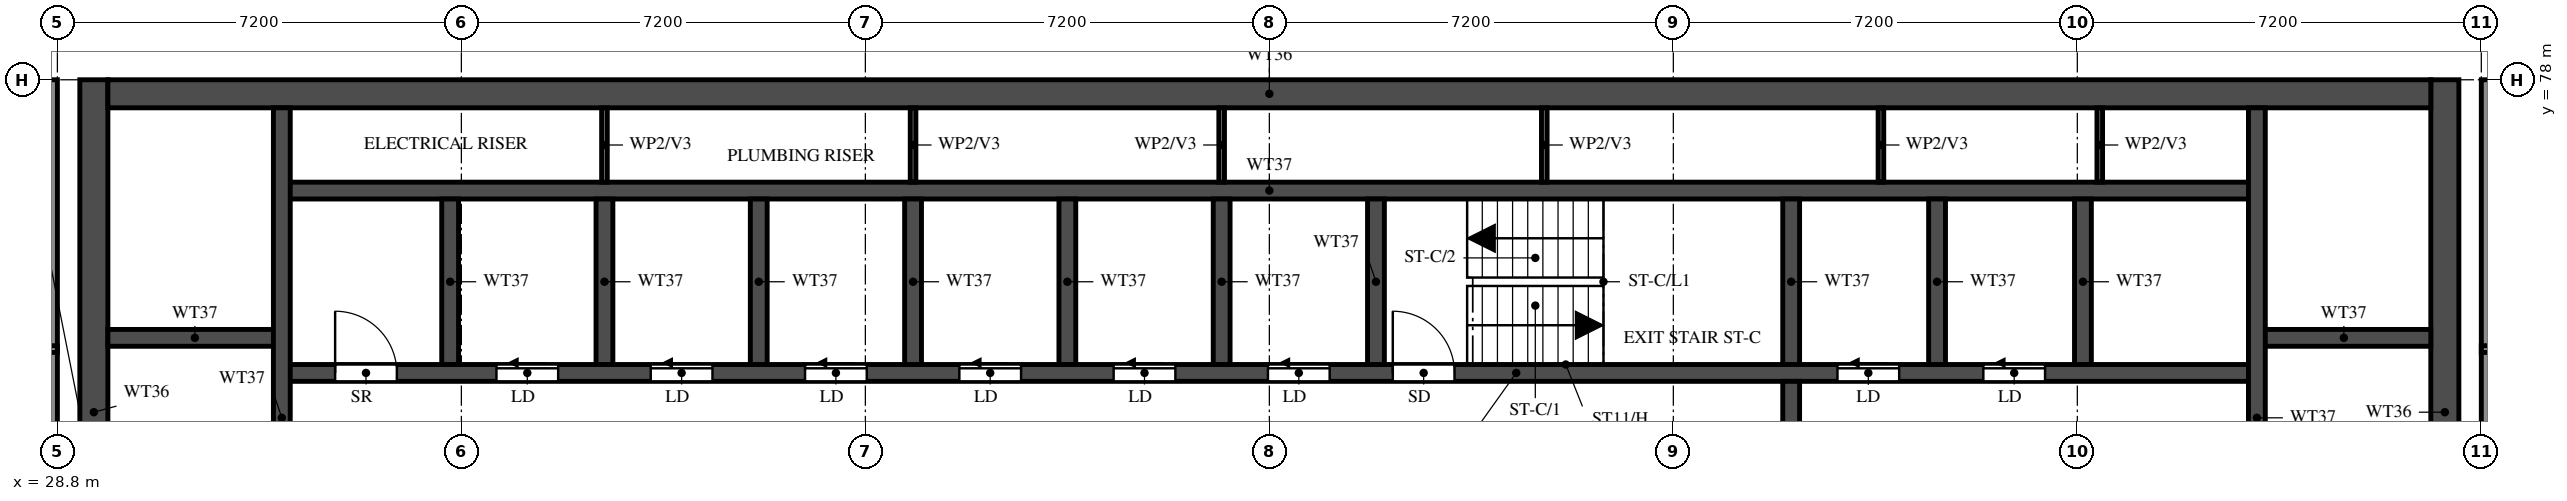
"""IFC4 building model, lengths in metres.
Left out: names, types, materials, properties, quantities, classifications, styles, units other than length and angle.
Written with IfcOpenShell. Run it as: python <this file> out.ifc"""

import sys

from ifc_helpers import new_model, si_unit, direction, frame, frame_2d, origin, place, context, subcontext, project, spatial, rectangle, extrude, element, fill, save


model = new_model("IFC4")
c1 = context("Model", 3, precision=1e-05, world=origin(), true_north=direction((0.0, 1.0)))
c2 = subcontext(c1, "Body", "Model", "MODEL_VIEW")
j1 = project(units=[si_unit("LENGTHUNIT", "METRE"), si_unit("PLANEANGLEUNIT", "RADIAN")], contexts=[c1])
p1 = place(None, origin())
s1 = spatial("IfcSite", under=j1, at=p1, CompositionType="ELEMENT")
p2 = place(p1, origin())
s2 = spatial("IfcBuilding", under=s1, at=p2, CompositionType="ELEMENT")
p3 = place(p2, frame((0.0, 0.0, 250.0)))
s3 = spatial("IfcBuildingStorey", under=s2, at=p3, CompositionType="ELEMENT", Elevation=250.0)
for number, where, z_axis, x_axis in (
    (1, (29.45, 66.15, 0.0), (0.0, 0.0, 1.0), (0.0, 1.0, 0.0)),
    (2, (71.35, 66.15, 0.0), (0.0, 0.0, 1.0), (0.0, 1.0, 0.0)),
):
    element("IfcWall", number, at=place(p3, frame(where, z_axis=z_axis, x_axis=x_axis)), inside=s3, PredefinedType="SHEAR", context=c2, shape_type="SweptSolid", body=[
        extrude(rectangle(XDim=11.85, YDim=0.5, at=frame_2d((5.925, 0.0))), origin(), (0.0, 0.0, 1.0), 3.22),
    ])
p4 = place(p3, frame((29.7, 77.75, 0.0), z_axis=(0.0, 0.0, 1.0), x_axis=(1.0, 0.0, 0.0)))
e3 = element("IfcWall", 3, at=p4, inside=s3, PredefinedType="SHEAR", context=c2, shape_type="SweptSolid", body=[
    extrude(rectangle(XDim=41.4, YDim=0.5, at=frame_2d((20.7, 0.0))), origin(), (0.0, 0.0, 1.0), 3.22),
])
p5 = place(p3, frame((32.8, 72.775, 0.0), z_axis=(0.0, 0.0, 1.0), x_axis=(1.0, 0.0, 0.0)))
e4 = element("IfcWall", 4, at=p5, inside=s3, PredefinedType="SHEAR", context=c2, shape_type="SweptSolid", body=[
    extrude(rectangle(XDim=35.2, YDim=0.3, at=frame_2d((17.6, 0.0))), origin(), (0.0, 0.0, 1.0), 3.22),
])
p6 = place(p5, frame((19.8, 0.0, 0.0)))
e5 = element("IfcOpeningElement", 5, at=p6, cuts=e4, PredefinedType="OPENING", context=c2, shape_type="SweptSolid", body=[
    extrude(rectangle(XDim=1.1, YDim=2.1, at=frame_2d((0.55, 1.05))), frame((0.0, 0.16, 0.0), z_axis=(0.0, -1.0, 0.0), x_axis=(1.0, 0.0, 0.0)), (0.0, 0.0, 1.0), 0.32),
])
p7 = place(p5, frame((27.725, 0.0, 0.0)))
e6 = element("IfcOpeningElement", 6, at=p7, cuts=e4, PredefinedType="OPENING", context=c2, shape_type="SweptSolid", body=[
    extrude(rectangle(XDim=1.1, YDim=2.1, at=frame_2d((0.55, 1.05))), frame((0.0, 0.16, 0.0), z_axis=(0.0, -1.0, 0.0), x_axis=(1.0, 0.0, 0.0)), (0.0, 0.0, 1.0), 0.32),
])
p8 = place(p5, frame((30.325, 0.0, 0.0)))
e7 = element("IfcOpeningElement", 7, at=p8, cuts=e4, PredefinedType="OPENING", context=c2, shape_type="SweptSolid", body=[
    extrude(rectangle(XDim=1.1, YDim=2.1, at=frame_2d((0.55, 1.05))), frame((0.0, 0.16, 0.0), z_axis=(0.0, -1.0, 0.0), x_axis=(1.0, 0.0, 0.0)), (0.0, 0.0, 1.0), 0.32),
])
p9 = place(p5, frame((3.825, 0.0, 0.0)))
e8 = element("IfcOpeningElement", 8, at=p9, cuts=e4, PredefinedType="OPENING", context=c2, shape_type="SweptSolid", body=[
    extrude(rectangle(XDim=1.1, YDim=2.1, at=frame_2d((0.55, 1.05))), frame((0.0, 0.16, 0.0), z_axis=(0.0, -1.0, 0.0), x_axis=(1.0, 0.0, 0.0)), (0.0, 0.0, 1.0), 0.32),
])
p10 = place(p5, frame((6.575, 0.0, 0.0)))
e9 = element("IfcOpeningElement", 9, at=p10, cuts=e4, PredefinedType="OPENING", context=c2, shape_type="SweptSolid", body=[
    extrude(rectangle(XDim=1.1, YDim=2.1, at=frame_2d((0.55, 1.05))), frame((0.0, 0.16, 0.0), z_axis=(0.0, -1.0, 0.0), x_axis=(1.0, 0.0, 0.0)), (0.0, 0.0, 1.0), 0.32),
])
p11 = place(p5, frame((9.325, 0.0, 0.0)))
e10 = element("IfcOpeningElement", 10, at=p11, cuts=e4, PredefinedType="OPENING", context=c2, shape_type="SweptSolid", body=[
    extrude(rectangle(XDim=1.1, YDim=2.1, at=frame_2d((0.55, 1.05))), frame((0.0, 0.16, 0.0), z_axis=(0.0, -1.0, 0.0), x_axis=(1.0, 0.0, 0.0)), (0.0, 0.0, 1.0), 0.32),
])
p12 = place(p5, frame((12.075, 0.0, 0.0)))
e11 = element("IfcOpeningElement", 11, at=p12, cuts=e4, PredefinedType="OPENING", context=c2, shape_type="SweptSolid", body=[
    extrude(rectangle(XDim=1.1, YDim=2.1, at=frame_2d((0.55, 1.05))), frame((0.0, 0.16, 0.0), z_axis=(0.0, -1.0, 0.0), x_axis=(1.0, 0.0, 0.0)), (0.0, 0.0, 1.0), 0.32),
])
p13 = place(p5, frame((14.825, 0.0, 0.0)))
e12 = element("IfcOpeningElement", 12, at=p13, cuts=e4, PredefinedType="OPENING", context=c2, shape_type="SweptSolid", body=[
    extrude(rectangle(XDim=1.1, YDim=2.1, at=frame_2d((0.55, 1.05))), frame((0.0, 0.16, 0.0), z_axis=(0.0, -1.0, 0.0), x_axis=(1.0, 0.0, 0.0)), (0.0, 0.0, 1.0), 0.32),
])
p14 = place(p5, frame((17.575, 0.0, 0.0)))
e13 = element("IfcOpeningElement", 13, at=p14, cuts=e4, PredefinedType="OPENING", context=c2, shape_type="SweptSolid", body=[
    extrude(rectangle(XDim=1.1, YDim=2.1, at=frame_2d((0.55, 1.05))), frame((0.0, 0.16, 0.0), z_axis=(0.0, -1.0, 0.0), x_axis=(1.0, 0.0, 0.0)), (0.0, 0.0, 1.0), 0.32),
])
p15 = place(p5, frame((0.95, 0.0, 0.0)))
e14 = element("IfcOpeningElement", 14, at=p15, cuts=e4, PredefinedType="OPENING", context=c2, shape_type="SweptSolid", body=[
    extrude(rectangle(XDim=1.1, YDim=2.1, at=frame_2d((0.55, 1.05))), frame((0.0, 0.16, 0.0), z_axis=(0.0, -1.0, 0.0), x_axis=(1.0, 0.0, 0.0)), (0.0, 0.0, 1.0), 0.32),
])
p16 = place(p3, frame((32.8, 76.025, 0.0), z_axis=(0.0, 0.0, 1.0), x_axis=(1.0, 0.0, 0.0)))
e15 = element("IfcWall", 15, at=p16, inside=s3, PredefinedType="SHEAR", context=c2, shape_type="SweptSolid", body=[
    extrude(rectangle(XDim=35.2, YDim=0.3, at=frame_2d((17.6, 0.0))), origin(), (0.0, 0.0, 1.0), 3.22),
])
for number, where, z_axis, x_axis in (
    (16, (29.7, 73.4, 0.0), (0.0, 0.0, 1.0), (1.0, 0.0, 0.0)),
    (17, (68.0, 73.4, 0.0), (0.0, 0.0, 1.0), (1.0, 0.0, 0.0)),
):
    element("IfcWall", number, at=place(p3, frame(where, z_axis=z_axis, x_axis=x_axis)), inside=s3, PredefinedType="SHEAR", context=c2, shape_type="SweptSolid", body=[
        extrude(rectangle(XDim=3.1, YDim=0.3, at=frame_2d((1.55, 0.0))), origin(), (0.0, 0.0, 1.0), 3.22),
    ])
p17 = place(p3, frame((32.8, 66.45, 0.0), z_axis=(0.0, 0.0, 1.0), x_axis=(0.0, 1.0, 0.0)))
e18 = element("IfcWall", 18, at=p17, inside=s3, PredefinedType="SHEAR", context=c2, shape_type="SweptSolid", body=[
    extrude(rectangle(XDim=11.05, YDim=0.3, at=frame_2d((5.525, 0.0))), origin(), (0.0, 0.0, 1.0), 3.22),
])
p18 = place(p3, frame((68.0, 66.45, 0.0), z_axis=(0.0, 0.0, 1.0), x_axis=(0.0, 1.0, 0.0)))
e19 = element("IfcWall", 19, at=p18, inside=s3, PredefinedType="SHEAR", context=c2, shape_type="SweptSolid", body=[
    extrude(rectangle(XDim=11.05, YDim=0.3, at=frame_2d((5.525, 0.0))), origin(), (0.0, 0.0, 1.0), 3.22),
])
p19 = place(p18, frame((0.15, 0.0, 0.0)))
e20 = element("IfcOpeningElement", 20, at=p19, cuts=e19, PredefinedType="OPENING", context=c2, shape_type="SweptSolid", body=[
    extrude(rectangle(XDim=1.1, YDim=2.1, at=frame_2d((0.55, 1.05))), frame((0.0, 0.16, 0.0), z_axis=(0.0, -1.0, 0.0), x_axis=(1.0, 0.0, 0.0)), (0.0, 0.0, 1.0), 0.32),
])
p20 = place(p3, frame((59.7, 66.45, 0.0), z_axis=(0.0, 0.0, 1.0), x_axis=(0.0, 1.0, 0.0)))
e21 = element("IfcWall", 21, at=p20, inside=s3, PredefinedType="SHEAR", context=c2, shape_type="SweptSolid", body=[
    extrude(rectangle(XDim=6.175, YDim=0.3, at=frame_2d((3.087, 0.0))), origin(), (0.0, 0.0, 1.0), 3.22),
])
p21 = place(p20, frame((3.85, 0.0, 0.0)))
e22 = element("IfcOpeningElement", 22, at=p21, cuts=e21, PredefinedType="OPENING", context=c2, shape_type="SweptSolid", body=[
    extrude(rectangle(XDim=1.2, YDim=2.1, at=frame_2d((0.6, 1.05))), frame((0.0, 0.16, 0.0), z_axis=(0.0, -1.0, 0.0), x_axis=(1.0, 0.0, 0.0)), (0.0, 0.0, 1.0), 0.32),
])
for number, where, z_axis, x_axis in (
    (23, (59.7, 72.925, 0.0), (0.0, 0.0, 1.0), (0.0, 1.0, 0.0)),
    (24, (35.8, 72.925, 0.0), (0.0, 0.0, 1.0), (0.0, 1.0, 0.0)),
    (25, (38.55, 72.925, 0.0), (0.0, 0.0, 1.0), (0.0, 1.0, 0.0)),
    (26, (41.3, 72.925, 0.0), (0.0, 0.0, 1.0), (0.0, 1.0, 0.0)),
    (27, (44.05, 72.925, 0.0), (0.0, 0.0, 1.0), (0.0, 1.0, 0.0)),
    (28, (46.8, 72.925, 0.0), (0.0, 0.0, 1.0), (0.0, 1.0, 0.0)),
    (29, (49.55, 72.925, 0.0), (0.0, 0.0, 1.0), (0.0, 1.0, 0.0)),
    (30, (52.3, 72.925, 0.0), (0.0, 0.0, 1.0), (0.0, 1.0, 0.0)),
    (31, (62.3, 72.925, 0.0), (0.0, 0.0, 1.0), (0.0, 1.0, 0.0)),
    (32, (64.9, 72.925, 0.0), (0.0, 0.0, 1.0), (0.0, 1.0, 0.0)),
):
    element("IfcWall", number, at=place(p3, frame(where, z_axis=z_axis, x_axis=x_axis)), inside=s3, PredefinedType="SHEAR", context=c2, shape_type="SweptSolid", body=[
        extrude(rectangle(XDim=2.95, YDim=0.3, at=frame_2d((1.475, 0.0))), origin(), (0.0, 0.0, 1.0), 3.22),
    ])
for number, where, z_axis, x_axis in (
    (33, (38.55, 76.175, 0.0), (0.0, 0.0, 1.0), (0.0, 1.0, 0.0)),
    (34, (44.05, 76.175, 0.0), (0.0, 0.0, 1.0), (0.0, 1.0, 0.0)),
    (35, (49.55, 76.175, 0.0), (0.0, 0.0, 1.0), (0.0, 1.0, 0.0)),
    (36, (55.3, 76.175, 0.0), (0.0, 0.0, 1.0), (0.0, 1.0, 0.0)),
    (37, (61.3, 76.175, 0.0), (0.0, 0.0, 1.0), (0.0, 1.0, 0.0)),
    (38, (65.2, 76.175, 0.0), (0.0, 0.0, 1.0), (0.0, 1.0, 0.0)),
):
    element("IfcWall", number, at=place(p3, frame(where, z_axis=z_axis, x_axis=x_axis)), inside=s3, PredefinedType="PARTITIONING", context=c2, shape_type="SweptSolid", body=[
        extrude(rectangle(XDim=1.325, YDim=0.1, at=frame_2d((0.663, 0.0))), origin(), (0.0, 0.0, 1.0), 3.22),
    ])
for number, where, z_axis, x_axis in (
    (39, (28.7, 62.4, 0.0), (0.0, 0.0, 1.0), (0.0, 1.0, 0.0)),
    (40, (72.1, 62.4, 0.0), (0.0, 0.0, 1.0), (0.0, 1.0, 0.0)),
):
    element("IfcWall", number, at=place(p3, frame(where, z_axis=z_axis, x_axis=x_axis)), inside=s3, PredefinedType="SOLIDWALL", context=c2, shape_type="SweptSolid", body=[
        extrude(rectangle(XDim=15.6, YDim=0.2, at=frame_2d((7.8, 0.0))), origin(), (0.0, 0.0, 1.0), 3.22),
    ])
p22 = place(p3, frame((18.525, 73.2, 0.0), z_axis=(0.0, 0.0, 1.0), x_axis=(1.0, 0.0, 0.0)))
e41 = element("IfcWall", 41, at=p22, inside=s3, PredefinedType="PARTITIONING", context=c2, shape_type="SweptSolid", body=[
    extrude(rectangle(XDim=10.275, YDim=0.12, at=frame_2d((5.138, 0.0))), origin(), (0.0, 0.0, 1.0), 2.32),
])
p23 = place(p22, frame((5.275, 0.0, 0.0)))
e42 = element("IfcOpeningElement", 42, at=p23, cuts=e41, PredefinedType="OPENING", context=c2, shape_type="SweptSolid", body=[
    extrude(rectangle(XDim=0.9, YDim=2.1, at=frame_2d((0.45, 1.05))), frame((0.0, 0.07, 0.0), z_axis=(0.0, -1.0, 0.0), x_axis=(1.0, 0.0, 0.0)), (0.0, 0.0, 1.0), 0.14),
])
p24 = place(p3, frame((72.0, 73.2, 0.0), z_axis=(0.0, 0.0, 1.0), x_axis=(1.0, 0.0, 0.0)))
e43 = element("IfcWall", 43, at=p24, inside=s3, PredefinedType="PARTITIONING", context=c2, shape_type="SweptSolid", body=[
    extrude(rectangle(XDim=10.275, YDim=0.12, at=frame_2d((5.137, 0.0))), origin(), (0.0, 0.0, 1.0), 2.32),
])
p25 = place(p24, frame((4.1, 0.0, 0.0)))
e44 = element("IfcOpeningElement", 44, at=p25, cuts=e43, PredefinedType="OPENING", context=c2, shape_type="SweptSolid", body=[
    extrude(rectangle(XDim=0.9, YDim=2.1, at=frame_2d((0.45, 1.05))), frame((0.0, 0.07, 0.0), z_axis=(0.0, -1.0, 0.0), x_axis=(1.0, 0.0, 0.0)), (0.0, 0.0, 1.0), 0.14),
])
p26 = place(p6, origin())
e45 = element("IfcDoor", 45, at=p26, inside=s3, OperationType="SINGLE_SWING_LEFT", PredefinedType="DOOR", context=c2, shape_type="SweptSolid", body=[
    extrude(rectangle(XDim=1.1, YDim=2.1, at=frame_2d((0.55, 1.05))), frame((0.0, 0.025, 0.0), z_axis=(0.0, -1.0, 0.0), x_axis=(1.0, 0.0, 0.0)), (0.0, 0.0, 1.0), 0.05),
])
fill(e5, e45)
p27 = place(p7, origin())
e46 = element("IfcDoor", 46, at=p27, inside=s3, OperationType="SLIDING_TO_LEFT", PredefinedType="DOOR", context=c2, shape_type="SweptSolid", body=[
    extrude(rectangle(XDim=1.1, YDim=2.1, at=frame_2d((0.55, 1.05))), frame((0.0, 0.025, 0.0), z_axis=(0.0, -1.0, 0.0), x_axis=(1.0, 0.0, 0.0)), (0.0, 0.0, 1.0), 0.05),
])
fill(e6, e46)
p28 = place(p8, origin())
e47 = element("IfcDoor", 47, at=p28, inside=s3, OperationType="SLIDING_TO_LEFT", PredefinedType="DOOR", context=c2, shape_type="SweptSolid", body=[
    extrude(rectangle(XDim=1.1, YDim=2.1, at=frame_2d((0.55, 1.05))), frame((0.0, 0.025, 0.0), z_axis=(0.0, -1.0, 0.0), x_axis=(1.0, 0.0, 0.0)), (0.0, 0.0, 1.0), 0.05),
])
fill(e7, e47)
p29 = place(p9, origin())
e48 = element("IfcDoor", 48, at=p29, inside=s3, OperationType="SLIDING_TO_LEFT", PredefinedType="DOOR", context=c2, shape_type="SweptSolid", body=[
    extrude(rectangle(XDim=1.1, YDim=2.1, at=frame_2d((0.55, 1.05))), frame((0.0, 0.025, 0.0), z_axis=(0.0, -1.0, 0.0), x_axis=(1.0, 0.0, 0.0)), (0.0, 0.0, 1.0), 0.05),
])
fill(e8, e48)
p30 = place(p10, origin())
e49 = element("IfcDoor", 49, at=p30, inside=s3, OperationType="SLIDING_TO_LEFT", PredefinedType="DOOR", context=c2, shape_type="SweptSolid", body=[
    extrude(rectangle(XDim=1.1, YDim=2.1, at=frame_2d((0.55, 1.05))), frame((0.0, 0.025, 0.0), z_axis=(0.0, -1.0, 0.0), x_axis=(1.0, 0.0, 0.0)), (0.0, 0.0, 1.0), 0.05),
])
fill(e9, e49)
p31 = place(p11, origin())
e50 = element("IfcDoor", 50, at=p31, inside=s3, OperationType="SLIDING_TO_LEFT", PredefinedType="DOOR", context=c2, shape_type="SweptSolid", body=[
    extrude(rectangle(XDim=1.1, YDim=2.1, at=frame_2d((0.55, 1.05))), frame((0.0, 0.025, 0.0), z_axis=(0.0, -1.0, 0.0), x_axis=(1.0, 0.0, 0.0)), (0.0, 0.0, 1.0), 0.05),
])
fill(e10, e50)
p32 = place(p12, origin())
e51 = element("IfcDoor", 51, at=p32, inside=s3, OperationType="SLIDING_TO_LEFT", PredefinedType="DOOR", context=c2, shape_type="SweptSolid", body=[
    extrude(rectangle(XDim=1.1, YDim=2.1, at=frame_2d((0.55, 1.05))), frame((0.0, 0.025, 0.0), z_axis=(0.0, -1.0, 0.0), x_axis=(1.0, 0.0, 0.0)), (0.0, 0.0, 1.0), 0.05),
])
fill(e11, e51)
p33 = place(p13, origin())
e52 = element("IfcDoor", 52, at=p33, inside=s3, OperationType="SLIDING_TO_LEFT", PredefinedType="DOOR", context=c2, shape_type="SweptSolid", body=[
    extrude(rectangle(XDim=1.1, YDim=2.1, at=frame_2d((0.55, 1.05))), frame((0.0, 0.025, 0.0), z_axis=(0.0, -1.0, 0.0), x_axis=(1.0, 0.0, 0.0)), (0.0, 0.0, 1.0), 0.05),
])
fill(e12, e52)
p34 = place(p14, origin())
e53 = element("IfcDoor", 53, at=p34, inside=s3, OperationType="SLIDING_TO_LEFT", PredefinedType="DOOR", context=c2, shape_type="SweptSolid", body=[
    extrude(rectangle(XDim=1.1, YDim=2.1, at=frame_2d((0.55, 1.05))), frame((0.0, 0.025, 0.0), z_axis=(0.0, -1.0, 0.0), x_axis=(1.0, 0.0, 0.0)), (0.0, 0.0, 1.0), 0.05),
])
fill(e13, e53)
p35 = place(p15, origin())
e54 = element("IfcDoor", 54, at=p35, inside=s3, OperationType="SINGLE_SWING_LEFT", PredefinedType="DOOR", context=c2, shape_type="SweptSolid", body=[
    extrude(rectangle(XDim=1.1, YDim=2.1, at=frame_2d((0.55, 1.05))), frame((0.0, 0.025, 0.0), z_axis=(0.0, -1.0, 0.0), x_axis=(1.0, 0.0, 0.0)), (0.0, 0.0, 1.0), 0.05),
])
fill(e14, e54)
save(model, sys.argv[1])
